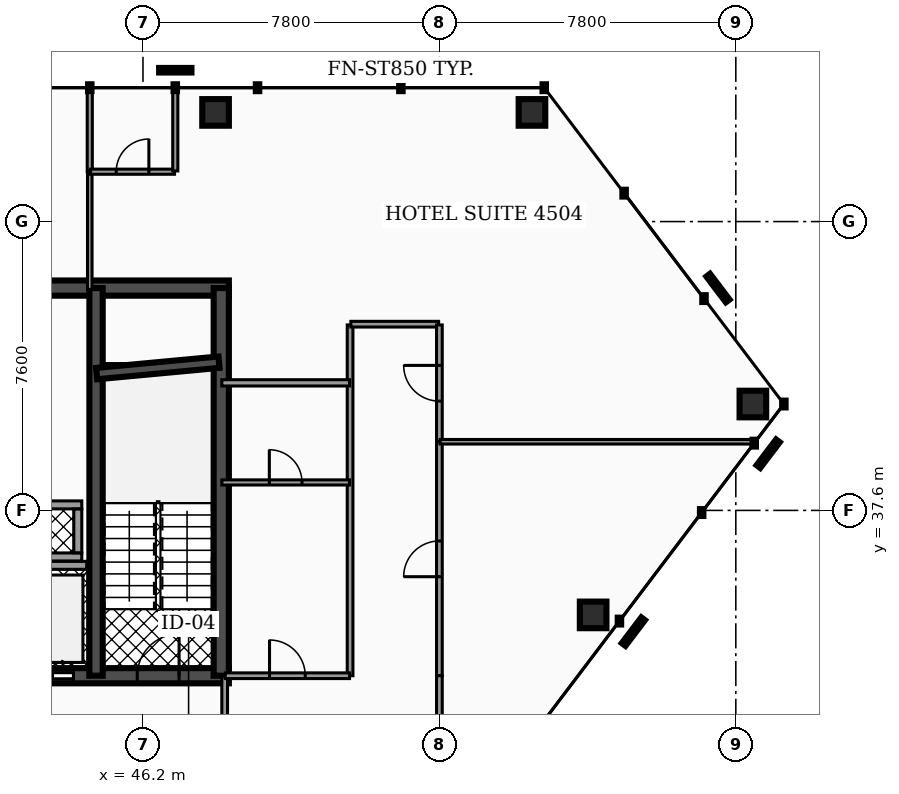
"""IFC4 building model, lengths in metres.
Left out: names, types, materials, properties, quantities, classifications, styles, units other than length and angle.
Written with IfcOpenShell. Run it as: python <this file> out.ifc"""

import sys

from ifc_helpers import new_model, si_unit, direction, frame, frame_2d, origin, origin_2d, place, context, subcontext, project, spatial, rectangle, hollow_rectangle, extrude, element, fill, save


model = new_model("IFC4")
c1 = context("Model", 3, precision=1e-05, world=origin(), true_north=direction((0.0, 1.0)))
c2 = subcontext(c1, "Body", "Model", "MODEL_VIEW")
j1 = project(units=[si_unit("LENGTHUNIT", "METRE"), si_unit("PLANEANGLEUNIT", "RADIAN")], contexts=[c1])
p1 = place(None, origin())
s1 = spatial("IfcSite", under=j1, at=p1, CompositionType="ELEMENT")
p2 = place(p1, origin())
s2 = spatial("IfcBuilding", under=s1, at=p2, CompositionType="ELEMENT")
p3 = place(p2, frame((0.0, 0.0, 183.26)))
s3 = spatial("IfcBuildingStorey", under=s2, at=p3, CompositionType="ELEMENT", Elevation=183.26)
p4 = place(p3, frame((28.4, 43.45, 0.0), z_axis=(0.0, 0.0, 1.0), x_axis=(1.0, 0.0, 0.0)))
e1 = element("IfcWall", 1, at=p4, inside=s3, PredefinedType="SHEAR", context=c2, shape_type="SweptSolid", body=[
    extrude(rectangle(XDim=20.06, YDim=0.4, at=frame_2d((10.03, 0.0))), origin(), (0.0, 0.0, 1.0), 3.5),
])
p5 = place(p3, frame((28.4, 33.25, 0.0), z_axis=(0.0, 0.0, 1.0), x_axis=(1.0, 0.0, 0.0)))
e2 = element("IfcWall", 2, at=p5, inside=s3, PredefinedType="SHEAR", context=c2, shape_type="SweptSolid", body=[
    extrude(rectangle(XDim=20.06, YDim=0.4, at=frame_2d((10.03, 0.0))), origin(), (0.0, 0.0, 1.0), 3.5),
])
p6 = place(p5, frame((4.03, 0.0, 0.0)))
e3 = element("IfcOpeningElement", 3, at=p6, cuts=e2, PredefinedType="OPENING", context=c2, shape_type="SweptSolid", body=[
    extrude(rectangle(XDim=1.1, YDim=2.15, at=frame_2d((0.55, 1.075))), frame((0.0, 0.21, 0.0), z_axis=(0.0, -1.0, 0.0), x_axis=(1.0, 0.0, 0.0)), (0.0, 0.0, 1.0), 0.42),
])
p7 = place(p5, frame((14.87, 0.0, 0.0)))
e4 = element("IfcOpeningElement", 4, at=p7, cuts=e2, PredefinedType="OPENING", context=c2, shape_type="SweptSolid", body=[
    extrude(rectangle(XDim=1.1, YDim=2.15, at=frame_2d((0.55, 1.075))), frame((0.0, 0.21, 0.0), z_axis=(0.0, -1.0, 0.0), x_axis=(1.0, 0.0, 0.0)), (0.0, 0.0, 1.0), 0.42),
])
p8 = place(p5, frame((5.95, 0.0, 0.0)))
e5 = element("IfcOpeningElement", 5, at=p8, cuts=e2, PredefinedType="OPENING", context=c2, shape_type="SweptSolid", body=[
    extrude(rectangle(XDim=1.0, YDim=2.1, at=frame_2d((0.5, 1.05))), frame((0.0, 0.21, 0.0), z_axis=(0.0, -1.0, 0.0), x_axis=(1.0, 0.0, 0.0)), (0.0, 0.0, 1.0), 0.42),
])
p9 = place(p5, frame((7.65, 0.0, 0.0)))
e6 = element("IfcOpeningElement", 6, at=p9, cuts=e2, PredefinedType="OPENING", context=c2, shape_type="SweptSolid", body=[
    extrude(rectangle(XDim=1.0, YDim=2.1, at=frame_2d((0.5, 1.05))), frame((0.0, 0.21, 0.0), z_axis=(0.0, -1.0, 0.0), x_axis=(1.0, 0.0, 0.0)), (0.0, 0.0, 1.0), 0.42),
])
p10 = place(p5, frame((1.31, 0.0, 0.0)))
e7 = element("IfcOpeningElement", 7, at=p10, cuts=e2, PredefinedType="OPENING", context=c2, shape_type="SweptSolid", body=[
    extrude(rectangle(XDim=1.1, YDim=2.2, at=frame_2d((0.55, 1.1))), frame((0.0, 0.21, 0.0), z_axis=(0.0, -1.0, 0.0), x_axis=(1.0, 0.0, 0.0)), (0.0, 0.0, 1.0), 0.42),
])
p11 = place(p5, frame((9.44, 0.0, 0.0)))
e8 = element("IfcOpeningElement", 8, at=p11, cuts=e2, PredefinedType="OPENING", context=c2, shape_type="SweptSolid", body=[
    extrude(rectangle(XDim=1.12, YDim=2.05, at=frame_2d((0.56, 1.025))), frame((0.0, 0.21, 0.0), z_axis=(0.0, -1.0, 0.0), x_axis=(1.0, 0.0, 0.0)), (0.0, 0.0, 1.0), 0.42),
])
p12 = place(p5, frame((17.65, 0.0, 0.0)))
e9 = element("IfcOpeningElement", 9, at=p12, cuts=e2, PredefinedType="OPENING", context=c2, shape_type="SweptSolid", body=[
    extrude(rectangle(XDim=1.1, YDim=2.2, at=frame_2d((0.55, 1.1))), frame((0.0, 0.21, 0.0), z_axis=(0.0, -1.0, 0.0), x_axis=(1.0, 0.0, 0.0)), (0.0, 0.0, 1.0), 0.42),
])
p13 = place(p3, frame((44.965, 33.25, 0.0), z_axis=(0.0, 0.0, 1.0), x_axis=(0.0, 1.0, 0.0)))
e10 = element("IfcWall", 10, at=p13, inside=s3, PredefinedType="SHEAR", context=c2, shape_type="SweptSolid", body=[
    extrude(rectangle(XDim=10.2, YDim=0.35, at=frame_2d((5.1, 0.0))), origin(), (0.0, 0.0, 1.0), 3.5),
])
p14 = place(p3, frame((48.26, 33.25, 0.0), z_axis=(0.0, 0.0, 1.0), x_axis=(0.0, 1.0, 0.0)))
e11 = element("IfcWall", 11, at=p14, inside=s3, PredefinedType="SHEAR", context=c2, shape_type="SweptSolid", body=[
    extrude(rectangle(XDim=10.2, YDim=0.4, at=frame_2d((5.1, 0.0))), origin(), (0.0, 0.0, 1.0), 3.5),
])
p15 = place(p3, frame((44.98, 41.2, 0.0), z_axis=(0.0, 0.0, 1.0), x_axis=(0.995686468965, 0.09278176286, 0.0)))
e12 = element("IfcWall", 12, at=p15, inside=s3, PredefinedType="SHEAR", context=c2, shape_type="SweptSolid", body=[
    extrude(rectangle(XDim=3.234, YDim=0.3, at=frame_2d((1.617, 0.0))), origin(), (0.0, 0.0, 1.0), 3.5),
])
p16 = place(p3, frame((56.436, 48.072, 0.0), z_axis=(0.09218822608, -0.033182207881, 0.995188561054), x_axis=(0.338669289805, 0.940905474606, 0.0)))
e13 = element("IfcColumn", 13, at=p16, inside=s3, PredefinedType="COLUMN", context=c2, shape_type="SweptSolid", body=[
    extrude(hollow_rectangle(XDim=0.7, YDim=0.7, WallThickness=0.035, at=origin_2d()), origin(), (0.0, 0.0, 1.0), 3.517),
])
p17 = place(p3, frame((48.11, 48.072, 0.0), z_axis=(0.041653819415, -0.033295193446, 0.998577182506), x_axis=(0.624376403662, 0.78112361797, 0.0)))
e14 = element("IfcColumn", 14, at=p17, inside=s3, PredefinedType="COLUMN", context=c2, shape_type="SweptSolid", body=[
    extrude(hollow_rectangle(XDim=0.7, YDim=0.7, WallThickness=0.035, at=origin_2d()), origin(), (0.0, 0.0, 1.0), 3.505),
])
p18 = place(p3, frame((58.045, 34.851, 0.0), z_axis=(-0.035907879203, 0.085428803519, 0.995697014026), x_axis=(-0.921875036522, -0.387487312099, 0.0)))
e15 = element("IfcColumn", 15, at=p18, inside=s3, PredefinedType="COLUMN", context=c2, shape_type="SweptSolid", body=[
    extrude(hollow_rectangle(XDim=0.7, YDim=0.7, WallThickness=0.035, at=origin_2d()), origin(), (0.0, 0.0, 1.0), 3.515),
])
p19 = place(p3, frame((62.249, 40.399, 0.0), z_axis=(-0.01670553271, 0.110492195599, 0.993736584759), x_axis=(-0.988762784989, -0.149492993214, 0.0)))
e16 = element("IfcColumn", 16, at=p19, inside=s3, PredefinedType="COLUMN", context=c2, shape_type="SweptSolid", body=[
    extrude(hollow_rectangle(XDim=0.7, YDim=0.7, WallThickness=0.035, at=origin_2d()), origin(), (0.0, 0.0, 1.0), 3.522),
])
p20 = place(p3, frame((42.92, 36.155, 0.0), z_axis=(0.0, 0.0, 1.0), x_axis=(1.0, 0.0, 0.0)))
e17 = element("IfcWall", 17, at=p20, inside=s3, PredefinedType="SOLIDWALL", context=c2, shape_type="SweptSolid", body=[
    extrude(rectangle(XDim=1.8, YDim=0.21, at=frame_2d((0.9, 0.0))), origin(), (0.0, 0.0, 1.0), 2.472),
])
for number, where, z_axis, x_axis in (
    (18, (42.99, 36.375, 0.0), (0.0, 0.0, 1.0), (1.0, 0.0, 0.0)),
    (19, (42.99, 37.745, 0.0), (0.0, 0.0, 1.0), (1.0, 0.0, 0.0)),
):
    element("IfcWall", number, at=place(p3, frame(where, z_axis=z_axis, x_axis=x_axis)), inside=s3, PredefinedType="SOLIDWALL", context=c2, shape_type="SweptSolid", body=[
        extrude(rectangle(XDim=1.6, YDim=0.21, at=frame_2d((0.8, 0.0))), origin(), (0.0, 0.0, 1.0), 3.5),
    ])
p21 = place(p3, frame((44.485, 36.485, 0.0), z_axis=(0.0, 0.0, 1.0), x_axis=(0.0, 1.0, 0.0)))
e20 = element("IfcWall", 20, at=p21, inside=s3, PredefinedType="SOLIDWALL", context=c2, shape_type="SweptSolid", body=[
    extrude(rectangle(XDim=1.15, YDim=0.21, at=frame_2d((0.575, 0.0))), origin(), (0.0, 0.0, 1.0), 3.5),
])
p22 = place(p3, frame((48.35, 30.17, 0.0), z_axis=(0.0, 0.0, 1.0), x_axis=(0.0, 1.0, 0.0)))
e21 = element("IfcWall", 21, at=p22, inside=s3, PredefinedType="PARTITIONING", context=c2, shape_type="SweptSolid", body=[
    extrude(rectangle(XDim=3.06, YDim=0.15, at=frame_2d((1.53, 0.0))), origin(), (0.0, 0.0, 1.0), 2.457),
])
p23 = place(p22, frame((1.06, 0.0, 0.0)))
e22 = element("IfcOpeningElement", 22, at=p23, cuts=e21, PredefinedType="OPENING", context=c2, shape_type="SweptSolid", body=[
    extrude(rectangle(XDim=0.94, YDim=2.05, at=frame_2d((0.47, 1.025))), frame((0.0, 0.085, 0.0), z_axis=(0.0, -1.0, 0.0), x_axis=(1.0, 0.0, 0.0)), (0.0, 0.0, 1.0), 0.17),
])
p24 = place(p3, frame((54.0, 33.25, 0.0), z_axis=(0.0, 0.0, 1.0), x_axis=(0.0, 1.0, 0.0)))
e23 = element("IfcWall", 23, at=p24, inside=s3, PredefinedType="PARTITIONING", context=c2, shape_type="SweptSolid", body=[
    extrude(rectangle(XDim=6.151, YDim=0.15, at=frame_2d((3.076, 0.0))), origin(), (0.0, 0.0, 1.0), 2.457),
])
p25 = place(p24, frame((2.606, 0.0, 0.0)))
e24 = element("IfcOpeningElement", 24, at=p25, cuts=e23, PredefinedType="OPENING", context=c2, shape_type="SweptSolid", body=[
    extrude(rectangle(XDim=0.94, YDim=2.05, at=frame_2d((0.47, 1.025))), frame((0.0, 0.085, 0.0), z_axis=(0.0, -1.0, 0.0), x_axis=(1.0, 0.0, 0.0)), (0.0, 0.0, 1.0), 0.17),
])
p26 = place(p3, frame((54.0, 32.197, 0.0), z_axis=(0.0, 0.0, 1.0), x_axis=(0.0, 1.0, 0.0)))
e25 = element("IfcWall", 25, at=p26, inside=s3, PredefinedType="PARTITIONING", context=c2, shape_type="SweptSolid", body=[
    extrude(rectangle(XDim=1.053, YDim=0.15, at=frame_2d((0.527, 0.0))), origin(), (0.0, 0.0, 1.0), 2.457),
])
p27 = place(p3, frame((51.65, 33.25, 0.0), z_axis=(0.0, 0.0, 1.0), x_axis=(0.0, 1.0, 0.0)))
e26 = element("IfcWall", 26, at=p27, inside=s3, PredefinedType="PARTITIONING", context=c2, shape_type="SweptSolid", body=[
    extrude(rectangle(XDim=9.23, YDim=0.15, at=frame_2d((4.615, 0.0))), origin(), (0.0, 0.0, 1.0), 2.457),
])
p28 = place(p3, frame((51.67, 42.5, 0.0), z_axis=(0.0, 0.0, 1.0), x_axis=(1.0, 0.0, 0.0)))
e27 = element("IfcWall", 27, at=p28, inside=s3, PredefinedType="PARTITIONING", context=c2, shape_type="SweptSolid", body=[
    extrude(rectangle(XDim=2.31, YDim=0.15, at=frame_2d((1.155, 0.0))), origin(), (0.0, 0.0, 1.0), 2.457),
])
p29 = place(p3, frame((54.0, 39.411, 0.0), z_axis=(0.0, 0.0, 1.0), x_axis=(0.0, 1.0, 0.0)))
e28 = element("IfcWall", 28, at=p29, inside=s3, PredefinedType="PARTITIONING", context=c2, shape_type="SweptSolid", body=[
    extrude(rectangle(XDim=3.069, YDim=0.15, at=frame_2d((1.534, 0.0))), origin(), (0.0, 0.0, 1.0), 2.457),
])
p30 = place(p29, frame((1.064, 0.0, 0.0)))
e29 = element("IfcOpeningElement", 29, at=p30, cuts=e28, PredefinedType="OPENING", context=c2, shape_type="SweptSolid", body=[
    extrude(rectangle(XDim=0.94, YDim=2.05, at=frame_2d((0.47, 1.025))), frame((0.0, 0.085, 0.0), z_axis=(0.0, -1.0, 0.0), x_axis=(1.0, 0.0, 0.0)), (0.0, 0.0, 1.0), 0.17),
])
p31 = place(p3, frame((48.365, 33.25, 0.0), z_axis=(0.0, 0.0, 1.0), x_axis=(1.0, 0.0, 0.0)))
e30 = element("IfcWall", 30, at=p31, inside=s3, PredefinedType="PARTITIONING", context=c2, shape_type="SweptSolid", body=[
    extrude(rectangle(XDim=3.27, YDim=0.15, at=frame_2d((1.635, 0.0))), origin(), (0.0, 0.0, 1.0), 2.457),
])
p32 = place(p31, frame((1.165, 0.0, 0.0)))
e31 = element("IfcOpeningElement", 31, at=p32, cuts=e30, PredefinedType="OPENING", context=c2, shape_type="SweptSolid", body=[
    extrude(rectangle(XDim=0.94, YDim=2.05, at=frame_2d((0.47, 1.025))), frame((0.0, 0.085, 0.0), z_axis=(0.0, -1.0, 0.0), x_axis=(1.0, 0.0, 0.0)), (0.0, 0.0, 1.0), 0.17),
])
p33 = place(p3, frame((44.8, 43.415, 0.0), z_axis=(0.0, 0.0, 1.0), x_axis=(0.0, 1.0, 0.0)))
e32 = element("IfcWall", 32, at=p33, inside=s3, PredefinedType="PARTITIONING", context=c2, shape_type="SweptSolid", body=[
    extrude(rectangle(XDim=3.092, YDim=0.12, at=frame_2d((1.546, 0.0))), origin(), (0.0, 0.0, 1.0), 2.457),
])
p34 = place(p3, frame((44.8, 46.517, 0.0), z_axis=(0.0, 0.0, 1.0), x_axis=(0.0, 1.0, 0.0)))
e33 = element("IfcWall", 33, at=p34, inside=s3, PredefinedType="PARTITIONING", context=c2, shape_type="SweptSolid", body=[
    extrude(rectangle(XDim=2.19, YDim=0.135, at=frame_2d((1.095, 0.0))), origin(), (0.0, 0.0, 1.0), 2.457),
])
p35 = place(p3, frame((54.02, 39.406, 0.0), z_axis=(0.0, 0.0, 1.0), x_axis=(1.0, 0.0, 0.0)))
e34 = element("IfcWall", 34, at=p35, inside=s3, PredefinedType="PARTITIONING", context=c2, shape_type="SweptSolid", body=[
    extrude(rectangle(XDim=8.277, YDim=0.12, at=frame_2d((4.139, 0.0))), origin(), (0.0, 0.0, 1.0), 2.457),
])
p36 = place(p3, frame((44.82, 46.512, 0.0), z_axis=(0.0, 0.0, 1.0), x_axis=(1.0, 0.0, 0.0)))
e35 = element("IfcWall", 35, at=p36, inside=s3, PredefinedType="PARTITIONING", context=c2, shape_type="SweptSolid", body=[
    extrude(rectangle(XDim=2.21, YDim=0.135, at=frame_2d((1.105, 0.0))), origin(), (0.0, 0.0, 1.0), 2.457),
])
p37 = place(p36, frame((0.675, 0.0, 0.0)))
e36 = element("IfcOpeningElement", 36, at=p37, cuts=e35, PredefinedType="OPENING", context=c2, shape_type="SweptSolid", body=[
    extrude(rectangle(XDim=0.86, YDim=2.05, at=frame_2d((0.43, 1.025))), frame((0.0, 0.077, 0.0), z_axis=(0.0, -1.0, 0.0), x_axis=(1.0, 0.0, 0.0)), (0.0, 0.0, 1.0), 0.155),
])
p38 = place(p3, frame((47.05, 46.532, 0.0), z_axis=(0.0, 0.0, 1.0), x_axis=(0.0, 1.0, 0.0)))
e37 = element("IfcWall", 37, at=p38, inside=s3, PredefinedType="PARTITIONING", context=c2, shape_type="SweptSolid", body=[
    extrude(rectangle(XDim=2.175, YDim=0.135, at=frame_2d((1.087, 0.0))), origin(), (0.0, 0.0, 1.0), 2.457),
])
p39 = place(p3, frame((48.275, 40.956, 0.0), z_axis=(0.0, 0.0, 1.0), x_axis=(1.0, 0.0, 0.0)))
e38 = element("IfcWall", 38, at=p39, inside=s3, PredefinedType="PARTITIONING", context=c2, shape_type="SweptSolid", body=[
    extrude(rectangle(XDim=3.36, YDim=0.165, at=frame_2d((1.68, 0.0))), origin(), (0.0, 0.0, 1.0), 2.457),
])
p40 = place(p3, frame((48.275, 38.336, 0.0), z_axis=(0.0, 0.0, 1.0), x_axis=(1.0, 0.0, 0.0)))
e39 = element("IfcWall", 39, at=p40, inside=s3, PredefinedType="PARTITIONING", context=c2, shape_type="SweptSolid", body=[
    extrude(rectangle(XDim=3.36, YDim=0.135, at=frame_2d((1.68, 0.0))), origin(), (0.0, 0.0, 1.0), 2.457),
])
p41 = place(p40, frame((1.25, 0.0, 0.0)))
e40 = element("IfcOpeningElement", 40, at=p41, cuts=e39, PredefinedType="OPENING", context=c2, shape_type="SweptSolid", body=[
    extrude(rectangle(XDim=0.86, YDim=2.05, at=frame_2d((0.43, 1.025))), frame((0.0, 0.077, 0.0), z_axis=(0.0, -1.0, 0.0), x_axis=(1.0, 0.0, 0.0)), (0.0, 0.0, 1.0), 0.155),
])
p42 = place(p7, origin())
e41 = element("IfcDoor", 41, at=p42, inside=s3, OperationType="SLIDING_TO_RIGHT", PredefinedType="DOOR", context=c2, shape_type="SweptSolid", body=[
    extrude(rectangle(XDim=1.1, YDim=2.15, at=frame_2d((0.55, 1.075))), frame((0.0, 0.025, 0.0), z_axis=(0.0, -1.0, 0.0), x_axis=(1.0, 0.0, 0.0)), (0.0, 0.0, 1.0), 0.05),
])
fill(e4, e41)
p43 = place(p12, origin())
e42 = element("IfcDoor", 42, at=p43, inside=s3, OperationType="SINGLE_SWING_RIGHT", PredefinedType="DOOR", context=c2, shape_type="SweptSolid", body=[
    extrude(rectangle(XDim=1.1, YDim=2.2, at=frame_2d((0.55, 1.1))), frame((0.0, 0.025, 0.0), z_axis=(0.0, -1.0, 0.0), x_axis=(1.0, 0.0, 0.0)), (0.0, 0.0, 1.0), 0.05),
])
fill(e9, e42)
p44 = place(p25, origin())
e43 = element("IfcDoor", 43, at=p44, inside=s3, OperationType="SINGLE_SWING_LEFT", PredefinedType="DOOR", context=c2, shape_type="SweptSolid", body=[
    extrude(rectangle(XDim=0.94, YDim=2.05, at=frame_2d((0.47, 1.025))), frame((0.0, 0.025, 0.0), z_axis=(0.0, -1.0, 0.0), x_axis=(1.0, 0.0, 0.0)), (0.0, 0.0, 1.0), 0.05),
])
fill(e24, e43)
p45 = place(p30, origin())
e44 = element("IfcDoor", 44, at=p45, inside=s3, OperationType="SINGLE_SWING_RIGHT", PredefinedType="DOOR", context=c2, shape_type="SweptSolid", body=[
    extrude(rectangle(XDim=0.94, YDim=2.05, at=frame_2d((0.47, 1.025))), frame((0.0, 0.025, 0.0), z_axis=(0.0, -1.0, 0.0), x_axis=(1.0, 0.0, 0.0)), (0.0, 0.0, 1.0), 0.05),
])
fill(e29, e44)
p46 = place(p32, origin())
e45 = element("IfcDoor", 45, at=p46, inside=s3, OperationType="SINGLE_SWING_LEFT", PredefinedType="DOOR", context=c2, shape_type="SweptSolid", body=[
    extrude(rectangle(XDim=0.94, YDim=2.05, at=frame_2d((0.47, 1.025))), frame((0.0, 0.025, 0.0), z_axis=(0.0, -1.0, 0.0), x_axis=(1.0, 0.0, 0.0)), (0.0, 0.0, 1.0), 0.05),
])
fill(e31, e45)
p47 = place(p37, origin())
e46 = element("IfcDoor", 46, at=p47, inside=s3, OperationType="SINGLE_SWING_RIGHT", PredefinedType="DOOR", context=c2, shape_type="SweptSolid", body=[
    extrude(rectangle(XDim=0.86, YDim=2.05, at=frame_2d((0.43, 1.025))), frame((0.0, 0.025, 0.0), z_axis=(0.0, -1.0, 0.0), x_axis=(1.0, 0.0, 0.0)), (0.0, 0.0, 1.0), 0.05),
])
fill(e36, e46)
p48 = place(p41, origin())
e47 = element("IfcDoor", 47, at=p48, inside=s3, OperationType="SINGLE_SWING_LEFT", PredefinedType="DOOR", context=c2, shape_type="SweptSolid", body=[
    extrude(rectangle(XDim=0.86, YDim=2.05, at=frame_2d((0.43, 1.025))), frame((0.0, 0.025, 0.0), z_axis=(0.0, -1.0, 0.0), x_axis=(1.0, 0.0, 0.0)), (0.0, 0.0, 1.0), 0.05),
])
fill(e40, e47)
save(model, sys.argv[1])
